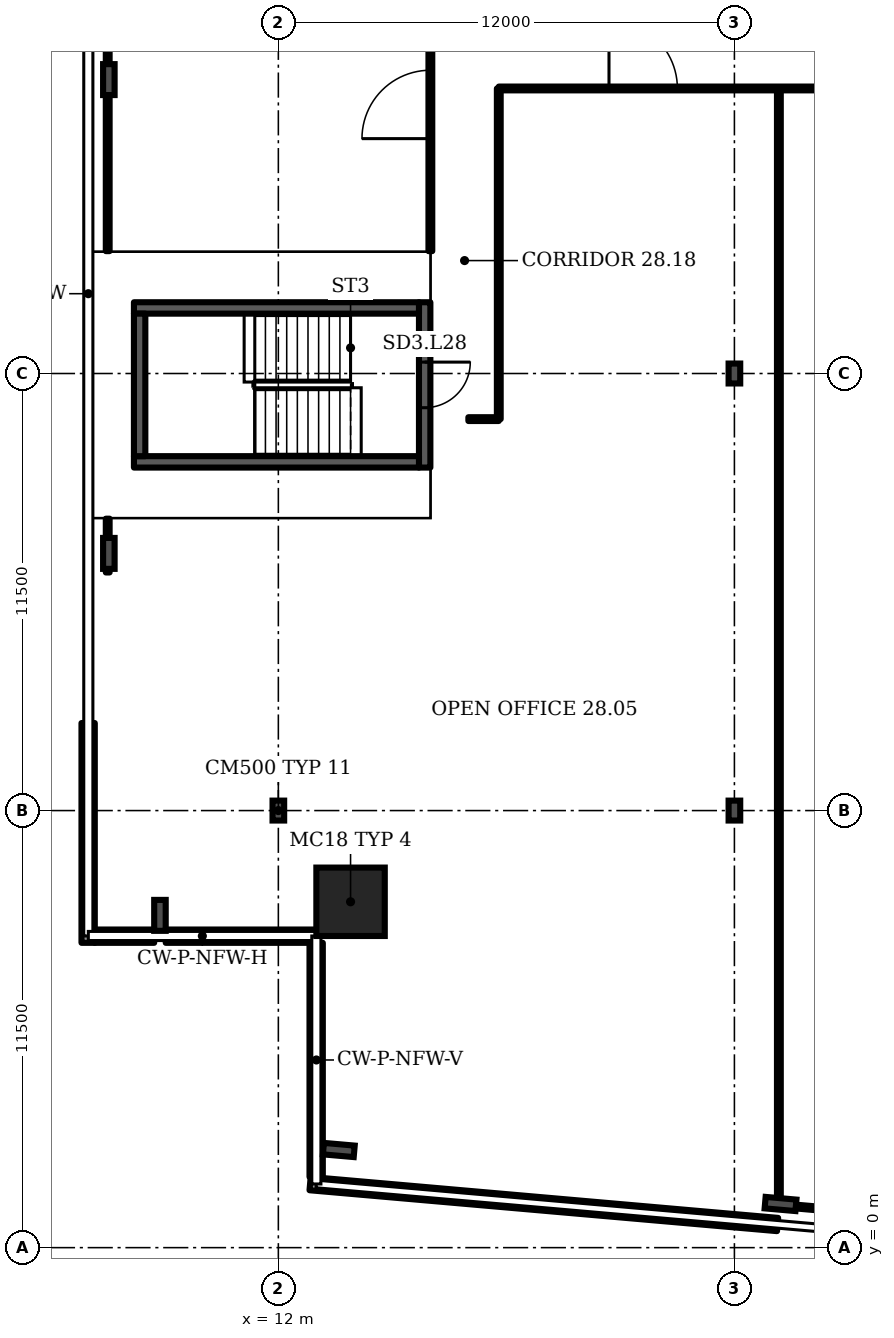
"""IFC4 building model, lengths in metres.
Left out: names, types, materials, properties, quantities, classifications, styles, units other than length and angle.
Written with IfcOpenShell. Run it as: python <this file> out.ifc"""

import sys

from ifc_helpers import new_model, si_unit, direction, frame, frame_2d, origin, origin_2d, place, context, subcontext, project, spatial, rectangle, i_section, extrude, element, fill, save


model = new_model("IFC4")
c1 = context("Model", 3, precision=1e-05, world=origin(), true_north=direction((0.0, 1.0)))
c2 = subcontext(c1, "Body", "Model", "MODEL_VIEW")
j1 = project(units=[si_unit("LENGTHUNIT", "METRE"), si_unit("PLANEANGLEUNIT", "RADIAN")], contexts=[c1])
p1 = place(None, origin())
s1 = spatial("IfcSite", under=j1, at=p1, CompositionType="ELEMENT")
p2 = place(p1, origin())
s2 = spatial("IfcBuilding", under=s1, at=p2, CompositionType="ELEMENT")
p3 = place(p2, frame((0.0, 0.0, 121.9)))
s3 = spatial("IfcBuildingStorey", under=s2, at=p3, CompositionType="ELEMENT", Elevation=121.9)
p4 = place(p3, frame((13.9, 9.1, 0.0), z_axis=(0.0, 0.0, 1.0), x_axis=(1.0, 0.0, 0.0)))
e1 = element("IfcColumn", 1, at=p4, inside=s3, PredefinedType="COLUMN", context=c2, shape_type="SweptSolid", body=[
    extrude(rectangle(XDim=1.8, YDim=1.8, at=origin_2d()), origin(), (0.0, 0.0, 1.0), 3.6),
])
for number, where, z_axis, x_axis in (
    (2, (13.591, 2.569, 0.0), (0.0, 0.0, 1.0), (-0.087, -0.996, 0.0)),
    (3, (25.214, 1.149, 0.0), (0.0, 0.0, 1.0), (-0.087, -0.996, 0.0)),
    (4, (7.54, 30.733, 0.0), (0.0, 0.0, 1.0), (-1.0, 0.0, 0.0)),
    (5, (7.54, 18.267, 0.0), (0.0, 0.0, 1.0), (-1.0, 0.0, 0.0)),
    (6, (8.885, 8.743, 0.0), (0.0, 0.0, 1.0), (-1.0, 0.0, 0.0)),
):
    element("IfcColumn", number, at=place(p3, frame(where, z_axis=z_axis, x_axis=x_axis)), inside=s3, PredefinedType="COLUMN", context=c2, shape_type="SweptSolid", body=[
        extrude(i_section(OverallWidth=0.303, OverallDepth=0.814, WebThickness=0.021, FlangeThickness=0.04, FilletRadius=0.03, at=origin_2d()), origin(), (0.0, 0.0, 1.0), 3.6),
    ])
for number, where, z_axis, x_axis in (
    (7, (12.0, 11.5, 0.0), (0.0, 0.0, 1.0), (1.0, 0.0, 0.0)),
    (8, (24.0, 11.5, 0.0), (0.0, 0.0, 1.0), (1.0, 0.0, 0.0)),
    (9, (24.0, 23.0, 0.0), (0.0, 0.0, 1.0), (1.0, 0.0, 0.0)),
):
    element("IfcColumn", number, at=place(p3, frame(where, z_axis=z_axis, x_axis=x_axis)), inside=s3, PredefinedType="COLUMN", context=c2, shape_type="SweptSolid", body=[
        extrude(i_section(OverallWidth=0.306, OverallDepth=0.524, WebThickness=0.021, FlangeThickness=0.04, FilletRadius=0.027, at=origin_2d()), origin(), (0.0, 0.0, 1.0), 3.6),
    ])
p5 = place(p3, frame((12.835, 1.685, 0.0), z_axis=(0.0, 0.0, 1.0), x_axis=(0.996192, -0.087173, 0.0)))
e10 = element("IfcWall", 10, at=p5, inside=s3, PredefinedType="SOLIDWALL", context=c2, shape_type="SweptSolid", body=[
    extrude(rectangle(XDim=12.348, YDim=0.35, at=frame_2d((6.174, 0.0))), origin(), (0.0, 0.0, 1.0), 1.0),
])
p6 = place(p3, frame((6.995, 13.803, 0.0), z_axis=(0.0, 0.0, 1.0), x_axis=(0.0, -1.0, 0.0)))
e11 = element("IfcWall", 11, at=p6, inside=s3, PredefinedType="SOLIDWALL", context=c2, shape_type="SweptSolid", body=[
    extrude(rectangle(XDim=5.783, YDim=0.35, at=frame_2d((2.892, 0.0))), origin(), (0.0, 0.0, 1.0), 1.0),
])
p7 = place(p3, frame((7.17, 8.195, 0.0), z_axis=(0.0, 0.0, 1.0), x_axis=(1.0, 0.0, 0.0)))
e12 = element("IfcWall", 12, at=p7, inside=s3, PredefinedType="SOLIDWALL", context=c2, shape_type="SweptSolid", body=[
    extrude(rectangle(XDim=1.563, YDim=0.35, at=frame_2d((0.782, 0.0))), origin(), (0.0, 0.0, 1.0), 1.0),
])
p8 = place(p3, frame((9.036, 8.195, 0.0), z_axis=(0.0, 0.0, 1.0), x_axis=(1.0, 0.0, 0.0)))
e13 = element("IfcWall", 13, at=p8, inside=s3, PredefinedType="SOLIDWALL", context=c2, shape_type="SweptSolid", body=[
    extrude(rectangle(XDim=3.964, YDim=0.35, at=frame_2d((1.982, 0.0))), origin(), (0.0, 0.0, 1.0), 1.0),
])
p9 = place(p3, frame((12.995, 8.02, 0.0), z_axis=(0.0, 0.0, 1.0), x_axis=(0.0, -1.0, 0.0)))
e14 = element("IfcWall", 14, at=p9, inside=s3, PredefinedType="SOLIDWALL", context=c2, shape_type="SweptSolid", body=[
    extrude(rectangle(XDim=6.161, YDim=0.35, at=frame_2d((3.081, 0.0))), origin(), (0.0, 0.0, 1.0), 1.0),
])
p10 = place(p3, frame((15.85, 20.525, 0.0), z_axis=(0.0, 0.0, 1.0), x_axis=(0.0, 1.0, 0.0)))
e15 = element("IfcWall", 15, at=p10, inside=s3, PredefinedType="SHEAR", context=c2, shape_type="SweptSolid", body=[
    extrude(rectangle(XDim=4.35, YDim=0.3, at=frame_2d((2.175, 0.0))), origin(), (0.0, 0.0, 1.0), 3.2),
])
p11 = place(p10, frame((1.575, 0.0, 0.0)))
e16 = element("IfcOpeningElement", 16, at=p11, cuts=e15, PredefinedType="OPENING", context=c2, shape_type="SweptSolid", body=[
    extrude(rectangle(XDim=1.2, YDim=2.1, at=frame_2d((0.6, 1.05))), frame((0.0, 0.16, 0.0), z_axis=(0.0, -1.0, 0.0), x_axis=(1.0, 0.0, 0.0)), (0.0, 0.0, 1.0), 0.32),
])
p12 = place(p3, frame((7.51, 17.765, 0.0), z_axis=(0.0, 0.0, 1.0), x_axis=(0.0, 1.0, 0.0)))
e17 = element("IfcWall", 17, at=p12, inside=s3, PredefinedType="PARTITIONING", context=c2, shape_type="SweptSolid", body=[
    extrude(rectangle(XDim=1.415, YDim=0.1, at=frame_2d((0.708, 0.0))), origin(), (0.0, 0.0, 1.0), 2.58),
])
p13 = place(p3, frame((7.51, 26.22, 0.0), z_axis=(0.0, 0.0, 1.0), x_axis=(0.0, 1.0, 0.0)))
e18 = element("IfcWall", 18, at=p13, inside=s3, PredefinedType="PARTITIONING", context=c2, shape_type="SweptSolid", body=[
    extrude(rectangle(XDim=15.76, YDim=0.1, at=frame_2d((7.88, 0.0))), origin(), (0.0, 0.0, 1.0), 2.58),
])
p14 = place(p3, frame((16.0, 26.22, 0.0), z_axis=(0.0, 0.0, 1.0), x_axis=(0.0, 1.0, 0.0)))
e19 = element("IfcWall", 19, at=p14, inside=s3, PredefinedType="PARTITIONING", context=c2, shape_type="SweptSolid", body=[
    extrude(rectangle(XDim=7.76, YDim=0.1, at=frame_2d((3.88, 0.0))), origin(), (0.0, 0.0, 1.0), 3.2),
])
p15 = place(p14, frame((2.96, 0.0, 0.0)))
e20 = element("IfcOpeningElement", 20, at=p15, cuts=e19, PredefinedType="OPENING", context=c2, shape_type="SweptSolid", body=[
    extrude(rectangle(XDim=1.8, YDim=2.1, at=frame_2d((0.9, 1.05))), frame((0.0, 0.06, 0.0), z_axis=(0.0, -1.0, 0.0), x_axis=(1.0, 0.0, 0.0)), (0.0, 0.0, 1.0), 0.12),
])
p16 = place(p3, frame((17.0, 21.8, 0.0), z_axis=(0.0, 0.0, 1.0), x_axis=(1.0, 0.0, 0.0)))
e21 = element("IfcWall", 21, at=p16, inside=s3, PredefinedType="PARTITIONING", context=c2, shape_type="SweptSolid", body=[
    extrude(rectangle(XDim=0.8, YDim=0.1, at=frame_2d((0.4, 0.0))), origin(), (0.0, 0.0, 1.0), 3.2),
])
p17 = place(p3, frame((17.8, 21.8, 0.0), z_axis=(0.0, 0.0, 1.0), x_axis=(0.0, 1.0, 0.0)))
e22 = element("IfcWall", 22, at=p17, inside=s3, PredefinedType="PARTITIONING", context=c2, shape_type="SweptSolid", body=[
    extrude(rectangle(XDim=8.7, YDim=0.1, at=frame_2d((4.35, 0.0))), origin(), (0.0, 0.0, 1.0), 3.2),
])
p18 = place(p3, frame((17.8, 30.5, 0.0), z_axis=(0.0, 0.0, 1.0), x_axis=(1.0, 0.0, 0.0)))
e23 = element("IfcWall", 23, at=p18, inside=s3, PredefinedType="PARTITIONING", context=c2, shape_type="SweptSolid", body=[
    extrude(rectangle(XDim=19.05, YDim=0.1, at=frame_2d((9.525, 0.0))), origin(), (0.0, 0.0, 1.0), 3.2),
])
p19 = place(p18, frame((2.9, 0.0, 0.0)))
e24 = element("IfcOpeningElement", 24, at=p19, cuts=e23, PredefinedType="OPENING", context=c2, shape_type="SweptSolid", body=[
    extrude(rectangle(XDim=1.8, YDim=2.1, at=frame_2d((0.9, 1.05))), frame((0.0, 0.06, 0.0), z_axis=(0.0, -1.0, 0.0), x_axis=(1.0, 0.0, 0.0)), (0.0, 0.0, 1.0), 0.12),
])
p20 = place(p18, frame((9.99, 0.0, 0.0)))
e25 = element("IfcOpeningElement", 25, at=p20, cuts=e23, PredefinedType="OPENING", context=c2, shape_type="SweptSolid", body=[
    extrude(rectangle(XDim=1.0, YDim=2.1, at=frame_2d((0.5, 1.05))), frame((0.0, 0.06, 0.0), z_axis=(0.0, -1.0, 0.0), x_axis=(1.0, 0.0, 0.0)), (0.0, 0.0, 1.0), 0.12),
])
p21 = place(p18, frame((15.75, 0.0, 0.0)))
e26 = element("IfcOpeningElement", 26, at=p21, cuts=e23, PredefinedType="OPENING", context=c2, shape_type="SweptSolid", body=[
    extrude(rectangle(XDim=1.0, YDim=2.1, at=frame_2d((0.5, 1.05))), frame((0.0, 0.06, 0.0), z_axis=(0.0, -1.0, 0.0), x_axis=(1.0, 0.0, 0.0)), (0.0, 0.0, 1.0), 0.12),
])
p22 = place(p3, frame((25.17, 1.12, 0.0), z_axis=(0.0, 0.0, 1.0), x_axis=(0.0, 1.0, 0.0)))
e27 = element("IfcWall", 27, at=p22, inside=s3, PredefinedType="PARTITIONING", context=c2, shape_type="SweptSolid", body=[
    extrude(rectangle(XDim=29.38, YDim=0.1, at=frame_2d((14.69, 0.0))), origin(), (0.0, 0.0, 1.0), 3.2),
])
p23 = place(p3, frame((31.25, 0.59, 0.0), z_axis=(0.0, 0.0, 1.0), x_axis=(-0.996218, 0.086845, 0.0)))
e28 = element("IfcWall", 28, at=p23, inside=s3, PredefinedType="PARTITIONING", context=c2, shape_type="SweptSolid", body=[
    extrude(rectangle(XDim=6.103, YDim=0.1, at=frame_2d((3.052, 0.0))), origin(), (0.0, 0.0, 1.0), 2.58),
])
for number, where, z_axis, x_axis in (
    (29, (8.2, 20.675, 0.0), (0.0, 0.0, 1.0), (1.0, 0.0, 0.0)),
    (30, (8.2, 24.725, 0.0), (0.0, 0.0, 1.0), (1.0, 0.0, 0.0)),
):
    element("IfcWall", number, at=place(p3, frame(where, z_axis=z_axis, x_axis=x_axis)), inside=s3, PredefinedType="SHEAR", context=c2, shape_type="SweptSolid", body=[
        extrude(rectangle(XDim=7.5, YDim=0.3, at=frame_2d((3.75, 0.0))), origin(), (0.0, 0.0, 1.0), 3.2),
    ])
p24 = place(p3, frame((8.35, 20.825, 0.0), z_axis=(0.0, 0.0, 1.0), x_axis=(0.0, 1.0, 0.0)))
e31 = element("IfcWall", 31, at=p24, inside=s3, PredefinedType="SHEAR", context=c2, shape_type="SweptSolid", body=[
    extrude(rectangle(XDim=3.75, YDim=0.3, at=frame_2d((1.875, 0.0))), origin(), (0.0, 0.0, 1.0), 3.2),
])
p25 = place(p11, origin())
e32 = element("IfcDoor", 32, at=p25, inside=s3, OperationType="SINGLE_SWING_RIGHT", PredefinedType="DOOR", context=c2, shape_type="SweptSolid", body=[
    extrude(rectangle(XDim=1.2, YDim=2.1, at=frame_2d((0.6, 1.05))), frame((0.0, 0.025, 0.0), z_axis=(0.0, -1.0, 0.0), x_axis=(1.0, 0.0, 0.0)), (0.0, 0.0, 1.0), 0.05),
])
fill(e16, e32)
p26 = place(p15, origin())
e33 = element("IfcDoor", 33, at=p26, inside=s3, OperationType="DOUBLE_DOOR_SINGLE_SWING", PredefinedType="DOOR", context=c2, shape_type="SweptSolid", body=[
    extrude(rectangle(XDim=1.8, YDim=2.1, at=frame_2d((0.9, 1.05))), frame((0.0, 0.025, 0.0), z_axis=(0.0, -1.0, 0.0), x_axis=(1.0, 0.0, 0.0)), (0.0, 0.0, 1.0), 0.05),
])
fill(e20, e33)
p27 = place(p19, origin())
e34 = element("IfcDoor", 34, at=p27, inside=s3, OperationType="DOUBLE_DOOR_SINGLE_SWING", PredefinedType="DOOR", context=c2, shape_type="SweptSolid", body=[
    extrude(rectangle(XDim=1.8, YDim=2.1, at=frame_2d((0.9, 1.05))), frame((0.0, 0.025, 0.0), z_axis=(0.0, -1.0, 0.0), x_axis=(1.0, 0.0, 0.0)), (0.0, 0.0, 1.0), 0.05),
])
fill(e24, e34)
save(model, sys.argv[1])
